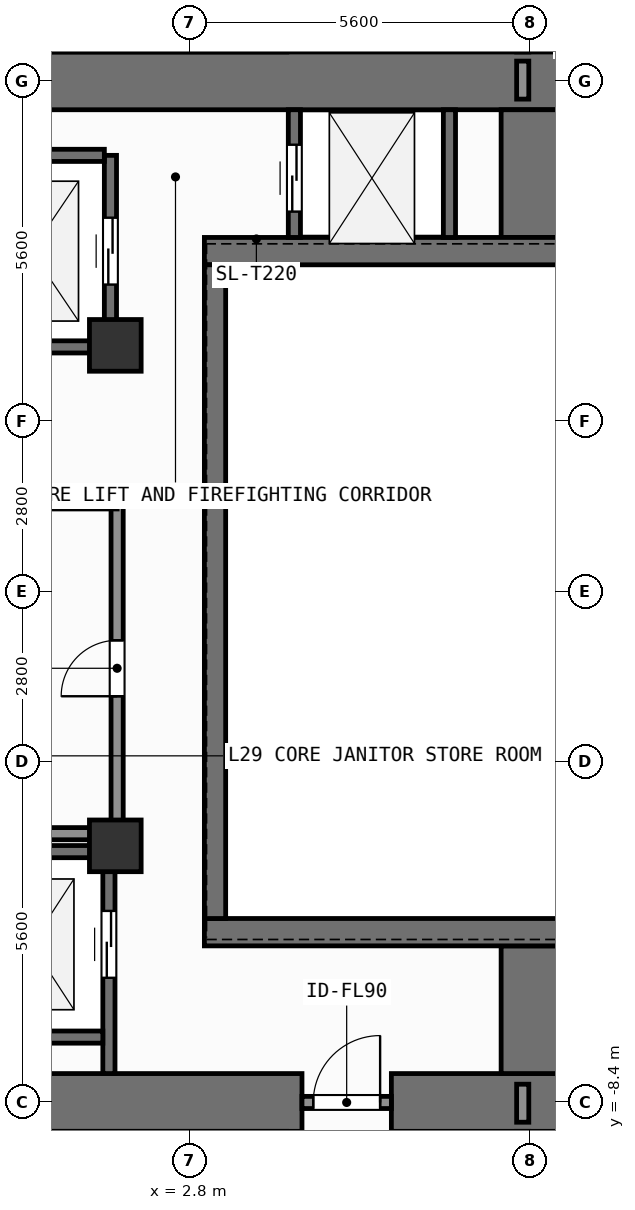
"""IFC4 building model, lengths in metres.
Left out: names, types, materials, properties, quantities, classifications, styles, units other than length and angle.
Written with IfcOpenShell. Run it as: python <this file> out.ifc"""

import sys

from ifc_helpers import new_model, si_unit, direction, frame, frame_2d, origin, origin_2d, place, context, subcontext, project, spatial, rectangle, extrude, element, fill, save


model = new_model("IFC4")
c1 = context("Model", 3, precision=1e-05, world=origin(), true_north=direction((0.0, 1.0)))
c2 = subcontext(c1, "Body", "Model", "MODEL_VIEW")
j1 = project(units=[si_unit("LENGTHUNIT", "METRE"), si_unit("PLANEANGLEUNIT", "RADIAN")], contexts=[c1])
p1 = place(None, origin())
s1 = spatial("IfcSite", under=j1, at=p1, CompositionType="ELEMENT")
p2 = place(p1, origin())
s2 = spatial("IfcBuilding", under=s1, at=p2, CompositionType="ELEMENT")
p3 = place(p2, frame((0.0, 0.0, 117.3)))
s3 = spatial("IfcBuildingStorey", under=s2, at=p3, CompositionType="ELEMENT", Elevation=117.3)
p4 = place(p3, frame((-2.62, -8.4, 0.0), z_axis=(0.0, 0.0, 1.0), x_axis=(1.0, 0.0, 0.0)))
e1 = element("IfcWall", 1, at=p4, inside=s3, PredefinedType="SHEAR", context=c2, shape_type="SweptSolid", body=[
    extrude(rectangle(XDim=7.27, YDim=0.95, at=frame_2d((3.635, 0.0))), origin(), (0.0, 0.0, 1.0), 3.9),
])
p5 = place(p3, frame((6.12, -8.4, 0.0), z_axis=(0.0, 0.0, 1.0), x_axis=(1.0, 0.0, 0.0)))
e2 = element("IfcWall", 2, at=p5, inside=s3, PredefinedType="SHEAR", context=c2, shape_type="SweptSolid", body=[
    extrude(rectangle(XDim=2.755, YDim=0.95, at=frame_2d((1.377, 0.0))), origin(), (0.0, 0.0, 1.0), 3.9),
])
p6 = place(p3, frame((-7.55, 8.4, 0.0), z_axis=(0.0, 0.0, 1.0), x_axis=(1.0, 0.0, 0.0)))
e3 = element("IfcWall", 3, at=p6, inside=s3, PredefinedType="SHEAR", context=c2, shape_type="SweptSolid", body=[
    extrude(rectangle(XDim=16.425, YDim=0.95, at=frame_2d((8.212, 0.0))), origin(), (0.0, 0.0, 1.0), 3.9),
])
for number, where, z_axis, x_axis in (
    (4, (8.4, -7.925, 0.0), (0.0, 0.0, 1.0), (0.0, 1.0, 0.0)),
    (5, (8.4, 5.825, 0.0), (0.0, 0.0, 1.0), (0.0, 1.0, 0.0)),
):
    element("IfcWall", number, at=place(p3, frame(where, z_axis=z_axis, x_axis=x_axis)), inside=s3, PredefinedType="SHEAR", context=c2, shape_type="SweptSolid", body=[
        extrude(rectangle(XDim=2.1, YDim=0.95, at=frame_2d((1.05, 0.0))), origin(), (0.0, 0.0, 1.0), 3.9),
    ])
for number, where, z_axis, x_axis in (
    (6, (3.045, -5.6, 0.0), (0.0, 0.0, 1.0), (1.0, 0.0, 0.0)),
    (7, (3.045, 5.6, 0.0), (0.0, 0.0, 1.0), (1.0, 0.0, 0.0)),
):
    element("IfcWall", number, at=place(p3, frame(where, z_axis=z_axis, x_axis=x_axis)), inside=s3, PredefinedType="SHEAR", context=c2, shape_type="SweptSolid", body=[
        extrude(rectangle(XDim=5.83, YDim=0.45, at=frame_2d((2.915, 0.0))), origin(), (0.0, 0.0, 1.0), 3.9),
    ])
p7 = place(p3, frame((3.22, -5.375, 0.0), z_axis=(0.0, 0.0, 1.0), x_axis=(0.0, 1.0, 0.0)))
e8 = element("IfcWall", 8, at=p7, inside=s3, PredefinedType="SHEAR", context=c2, shape_type="SweptSolid", body=[
    extrude(rectangle(XDim=10.75, YDim=0.35, at=frame_2d((5.375, 0.0))), origin(), (0.0, 0.0, 1.0), 3.9),
])
for number, where, z_axis, x_axis in (
    (9, (1.58, -4.18, 0.0), (0.0, 0.0, 1.0), (1.0, 0.0, 0.0)),
    (10, (1.58, 4.05, 0.0), (0.0, 0.0, 1.0), (1.0, 0.0, 0.0)),
):
    element("IfcColumn", number, at=place(p3, frame(where, z_axis=z_axis, x_axis=x_axis)), inside=s3, PredefinedType="COLUMN", context=c2, shape_type="SweptSolid", body=[
        extrude(rectangle(XDim=0.85, YDim=0.85, at=origin_2d()), origin(), (0.0, 0.0, 1.0), 3.9),
    ])
p8 = place(p3, frame((1.5, 4.025, 0.0), z_axis=(0.0, 0.0, 1.0), x_axis=(0.0, 1.0, 0.0)))
e11 = element("IfcWall", 11, at=p8, inside=s3, PredefinedType="SHEAR", context=c2, shape_type="SweptSolid", body=[
    extrude(rectangle(XDim=3.15, YDim=0.2, at=frame_2d((1.575, 0.0))), origin(), (0.0, 0.0, 1.0), 3.68),
])
p9 = place(p8, frame((1.025, 0.0, 0.0)))
e12 = element("IfcOpeningElement", 12, at=p9, cuts=e11, PredefinedType="OPENING", context=c2, shape_type="SweptSolid", body=[
    extrude(rectangle(XDim=1.1, YDim=2.2, at=frame_2d((0.55, 1.1))), frame((0.0, 0.11, 0.0), z_axis=(0.0, -1.0, 0.0), x_axis=(1.0, 0.0, 0.0)), (0.0, 0.0, 1.0), 0.22),
])
for number, where, z_axis, x_axis in (
    (13, (-1.0, 4.025, 0.0), (0.0, 0.0, 1.0), (1.0, 0.0, 0.0)),
    (14, (-1.0, 7.175, 0.0), (0.0, 0.0, 1.0), (1.0, 0.0, 0.0)),
):
    element("IfcWall", number, at=place(p3, frame(where, z_axis=z_axis, x_axis=x_axis)), inside=s3, PredefinedType="SHEAR", context=c2, shape_type="SweptSolid", body=[
        extrude(rectangle(XDim=2.4, YDim=0.2, at=frame_2d((1.2, 0.0))), origin(), (0.0, 0.0, 1.0), 3.68),
    ])
p10 = place(p3, frame((1.475, -7.925, 0.0), z_axis=(0.0, 0.0, 1.0), x_axis=(0.0, 1.0, 0.0)))
e15 = element("IfcWall", 15, at=p10, inside=s3, PredefinedType="SHEAR", context=c2, shape_type="SweptSolid", body=[
    extrude(rectangle(XDim=3.65, YDim=0.2, at=frame_2d((1.825, 0.0))), origin(), (0.0, 0.0, 1.0), 3.68),
])
p11 = place(p10, frame((1.575, 0.0, 0.0)))
e16 = element("IfcOpeningElement", 16, at=p11, cuts=e15, PredefinedType="OPENING", context=c2, shape_type="SweptSolid", body=[
    extrude(rectangle(XDim=1.1, YDim=2.2, at=frame_2d((0.55, 1.1))), frame((0.0, 0.11, 0.0), z_axis=(0.0, -1.0, 0.0), x_axis=(1.0, 0.0, 0.0)), (0.0, 0.0, 1.0), 0.22),
])
for number, where, z_axis, x_axis in (
    (17, (-0.975, -7.325, 0.0), (0.0, 0.0, 1.0), (1.0, 0.0, 0.0)),
    (18, (-0.975, -4.275, 0.0), (0.0, 0.0, 1.0), (1.0, 0.0, 0.0)),
):
    element("IfcWall", number, at=place(p3, frame(where, z_axis=z_axis, x_axis=x_axis)), inside=s3, PredefinedType="SHEAR", context=c2, shape_type="SweptSolid", body=[
        extrude(rectangle(XDim=2.35, YDim=0.2, at=frame_2d((1.175, 0.0))), origin(), (0.0, 0.0, 1.0), 3.68),
    ])
p12 = place(p3, frame((4.525, 5.825, 0.0), z_axis=(0.0, 0.0, 1.0), x_axis=(0.0, 1.0, 0.0)))
e19 = element("IfcWall", 19, at=p12, inside=s3, PredefinedType="SHEAR", context=c2, shape_type="SweptSolid", body=[
    extrude(rectangle(XDim=2.1, YDim=0.2, at=frame_2d((1.05, 0.0))), origin(), (0.0, 0.0, 1.0), 3.68),
])
p13 = place(p12, frame((0.425, 0.0, 0.0)))
e20 = element("IfcOpeningElement", 20, at=p13, cuts=e19, PredefinedType="OPENING", context=c2, shape_type="SweptSolid", body=[
    extrude(rectangle(XDim=1.1, YDim=2.2, at=frame_2d((0.55, 1.1))), frame((0.0, 0.11, 0.0), z_axis=(0.0, -1.0, 0.0), x_axis=(1.0, 0.0, 0.0)), (0.0, 0.0, 1.0), 0.22),
])
p14 = place(p3, frame((7.075, 5.825, 0.0), z_axis=(0.0, 0.0, 1.0), x_axis=(0.0, 1.0, 0.0)))
e21 = element("IfcWall", 21, at=p14, inside=s3, PredefinedType="SHEAR", context=c2, shape_type="SweptSolid", body=[
    extrude(rectangle(XDim=2.1, YDim=0.2, at=frame_2d((1.05, 0.0))), origin(), (0.0, 0.0, 1.0), 3.68),
])
p15 = place(p3, frame((4.65, -8.4, 0.0), z_axis=(0.0, 0.0, 1.0), x_axis=(1.0, 0.0, 0.0)))
e22 = element("IfcWall", 22, at=p15, inside=s3, PredefinedType="SOLIDWALL", context=c2, shape_type="SweptSolid", body=[
    extrude(rectangle(XDim=1.47, YDim=0.2, at=frame_2d((0.735, 0.0))), origin(), (0.0, 0.0, 1.0), 2.72),
])
p16 = place(p15, frame((0.185, 0.0, 0.0)))
e23 = element("IfcOpeningElement", 23, at=p16, cuts=e22, PredefinedType="OPENING", context=c2, shape_type="SweptSolid", body=[
    extrude(rectangle(XDim=1.1, YDim=2.15, at=frame_2d((0.55, 1.075))), frame((0.0, 0.11, 0.0), z_axis=(0.0, -1.0, 0.0), x_axis=(1.0, 0.0, 0.0)), (0.0, 0.0, 1.0), 0.22),
])
p17 = place(p3, frame((1.61, -3.98, 0.0), z_axis=(0.0, 0.0, 1.0), x_axis=(0.0, 1.0, 0.0)))
e24 = element("IfcWall", 24, at=p17, inside=s3, PredefinedType="SOLIDWALL", context=c2, shape_type="SweptSolid", body=[
    extrude(rectangle(XDim=5.44, YDim=0.2, at=frame_2d((2.72, 0.0))), origin(), (0.0, 0.0, 1.0), 3.68),
])
p18 = place(p17, frame((2.26, 0.0, 0.0)))
e25 = element("IfcOpeningElement", 25, at=p18, cuts=e24, PredefinedType="OPENING", context=c2, shape_type="SweptSolid", body=[
    extrude(rectangle(XDim=0.92, YDim=2.1, at=frame_2d((0.46, 1.05))), frame((0.0, 0.11, 0.0), z_axis=(0.0, -1.0, 0.0), x_axis=(1.0, 0.0, 0.0)), (0.0, 0.0, 1.0), 0.22),
])
for number, where, z_axis, x_axis in (
    (26, (-1.58, -3.98, 0.0), (0.0, 0.0, 1.0), (1.0, 0.0, 0.0)),
    (27, (-1.58, 1.46, 0.0), (0.0, 0.0, 1.0), (1.0, 0.0, 0.0)),
):
    element("IfcWall", number, at=place(p3, frame(where, z_axis=z_axis, x_axis=x_axis)), inside=s3, PredefinedType="SOLIDWALL", context=c2, shape_type="SweptSolid", body=[
        extrude(rectangle(XDim=3.19, YDim=0.2, at=frame_2d((1.595, 0.0))), origin(), (0.0, 0.0, 1.0), 3.68),
    ])
for number, where, z_axis, x_axis in (
    (28, (8.28, -8.725, 0.0), (0.0, 0.0, 1.0), (0.0, 1.0, 0.0)),
    (29, (8.28, 8.1, 0.0), (0.0, 0.0, 1.0), (0.0, 1.0, 0.0)),
):
    element("IfcWall", number, at=place(p3, frame(where, z_axis=z_axis, x_axis=x_axis)), inside=s3, PredefinedType="SOLIDWALL", context=c2, shape_type="SweptSolid", body=[
        extrude(rectangle(XDim=0.625, YDim=0.2, at=frame_2d((0.312, 0.0))), origin(), (0.0, 0.0, 1.0), 3.68),
    ])
p19 = place(p9, origin())
e30 = element("IfcDoor", 30, at=p19, inside=s3, OperationType="SLIDING_TO_LEFT", PredefinedType="DOOR", context=c2, shape_type="SweptSolid", body=[
    extrude(rectangle(XDim=1.1, YDim=2.2, at=frame_2d((0.55, 1.1))), frame((0.0, 0.025, 0.0), z_axis=(0.0, -1.0, 0.0), x_axis=(1.0, 0.0, 0.0)), (0.0, 0.0, 1.0), 0.05),
])
fill(e12, e30)
p20 = place(p11, origin())
e31 = element("IfcDoor", 31, at=p20, inside=s3, OperationType="SLIDING_TO_LEFT", PredefinedType="DOOR", context=c2, shape_type="SweptSolid", body=[
    extrude(rectangle(XDim=1.1, YDim=2.2, at=frame_2d((0.55, 1.1))), frame((0.0, 0.025, 0.0), z_axis=(0.0, -1.0, 0.0), x_axis=(1.0, 0.0, 0.0)), (0.0, 0.0, 1.0), 0.05),
])
fill(e16, e31)
p21 = place(p13, origin())
e32 = element("IfcDoor", 32, at=p21, inside=s3, OperationType="SLIDING_TO_LEFT", PredefinedType="DOOR", context=c2, shape_type="SweptSolid", body=[
    extrude(rectangle(XDim=1.1, YDim=2.2, at=frame_2d((0.55, 1.1))), frame((0.0, 0.025, 0.0), z_axis=(0.0, -1.0, 0.0), x_axis=(1.0, 0.0, 0.0)), (0.0, 0.0, 1.0), 0.05),
])
fill(e20, e32)
p22 = place(p16, origin())
e33 = element("IfcDoor", 33, at=p22, inside=s3, OperationType="SINGLE_SWING_RIGHT", PredefinedType="DOOR", context=c2, shape_type="SweptSolid", body=[
    extrude(rectangle(XDim=1.1, YDim=2.15, at=frame_2d((0.55, 1.075))), frame((0.0, 0.025, 0.0), z_axis=(0.0, -1.0, 0.0), x_axis=(1.0, 0.0, 0.0)), (0.0, 0.0, 1.0), 0.05),
])
fill(e23, e33)
p23 = place(p18, origin())
e34 = element("IfcDoor", 34, at=p23, inside=s3, OperationType="SINGLE_SWING_LEFT", PredefinedType="DOOR", context=c2, shape_type="SweptSolid", body=[
    extrude(rectangle(XDim=0.92, YDim=2.1, at=frame_2d((0.46, 1.05))), frame((0.0, 0.025, 0.0), z_axis=(0.0, -1.0, 0.0), x_axis=(1.0, 0.0, 0.0)), (0.0, 0.0, 1.0), 0.05),
])
fill(e25, e34)
save(model, sys.argv[1])
